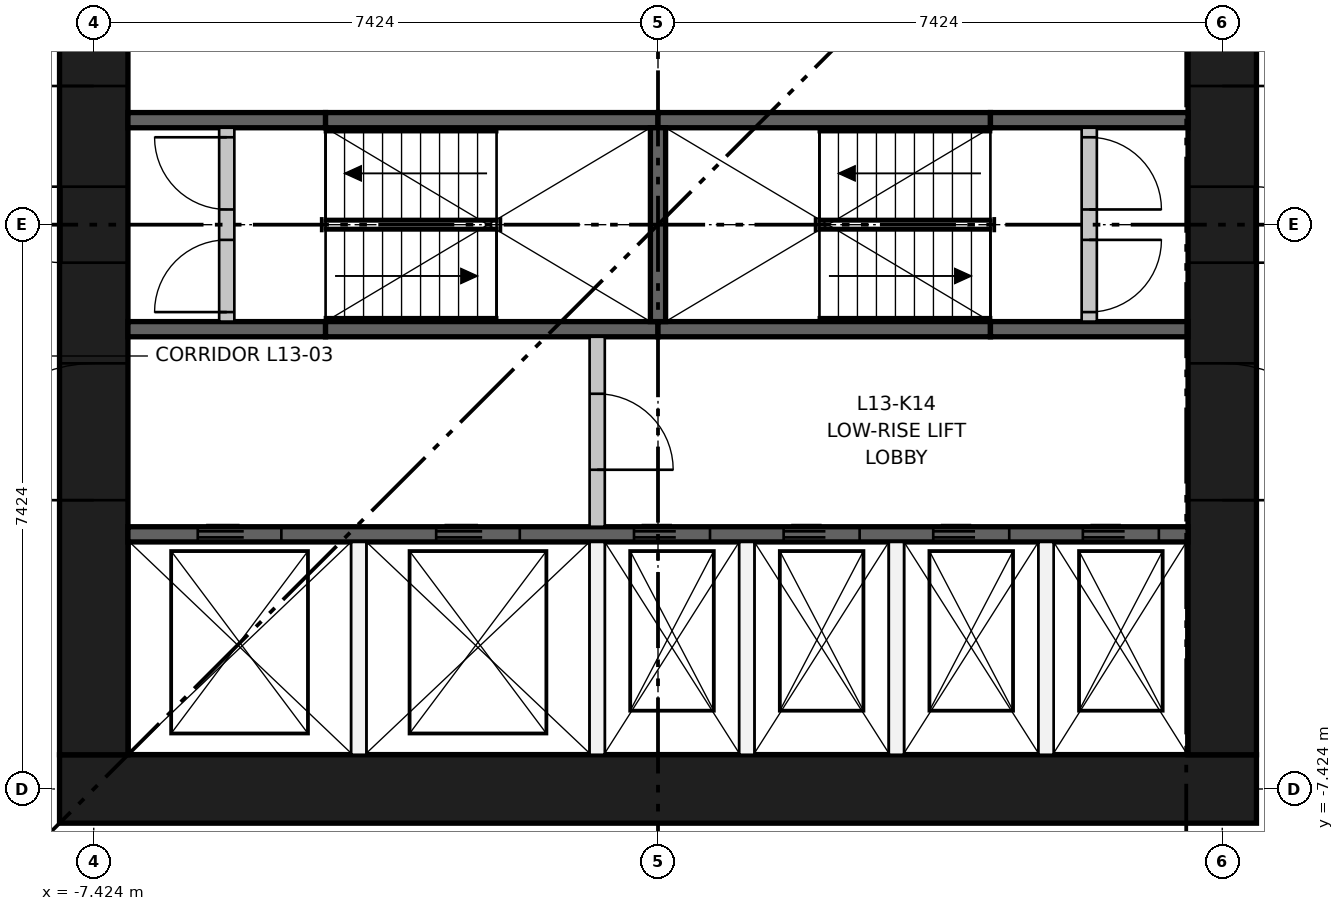
"""IFC4 building model, lengths in metres.
Left out: names, types, materials, properties, quantities, classifications, styles, units other than length and angle.
Written with IfcOpenShell. Run it as: python <this file> out.ifc"""

import sys

from ifc_helpers import new_model, si_unit, direction, frame, frame_2d, origin, place, context, subcontext, project, spatial, rectangle, extrude, element, fill, save


model = new_model("IFC4")
c1 = context("Model", 3, precision=1e-05, world=origin(), true_north=direction((0.0, 1.0)))
c2 = subcontext(c1, "Body", "Model", "MODEL_VIEW")
j1 = project(units=[si_unit("LENGTHUNIT", "METRE"), si_unit("PLANEANGLEUNIT", "RADIAN")], contexts=[c1])
p1 = place(None, origin())
s1 = spatial("IfcSite", under=j1, at=p1, CompositionType="ELEMENT")
p2 = place(p1, origin())
s2 = spatial("IfcBuilding", under=s1, at=p2, CompositionType="ELEMENT")
p3 = place(p2, frame((0.0, 0.0, 51.75)))
s3 = spatial("IfcBuildingStorey", under=s2, at=p3, CompositionType="ELEMENT", Elevation=51.75)
p4 = place(p3, frame((-7.874, -7.424, 0.0), z_axis=(0.0, 0.0, 1.0), x_axis=(1.0, 0.0, 0.0)))
e1 = element("IfcWall", 1, at=p4, inside=s3, PredefinedType="SHEAR", context=c2, shape_type="SweptSolid", body=[
    extrude(rectangle(XDim=15.748, YDim=0.9, at=frame_2d((7.874, 0.0))), origin(), (0.0, 0.0, 1.0), 3.65),
])
p5 = place(p3, frame((-7.424, -6.974, 0.0), z_axis=(0.0, 0.0, 1.0), x_axis=(0.0, 1.0, 0.0)))
e2 = element("IfcWall", 2, at=p5, inside=s3, PredefinedType="SHEAR", context=c2, shape_type="SweptSolid", body=[
    extrude(rectangle(XDim=13.948, YDim=0.9, at=frame_2d((6.974, 0.0))), origin(), (0.0, 0.0, 1.0), 3.65),
])
p6 = place(p5, frame((6.474, 0.0, 0.0)))
e3 = element("IfcOpeningElement", 3, at=p6, cuts=e2, PredefinedType="OPENING", context=c2, shape_type="SweptSolid", body=[
    extrude(rectangle(XDim=1.0, YDim=2.1, at=frame_2d((0.5, 1.05))), frame((0.0, 0.46, 0.0), z_axis=(0.0, -1.0, 0.0), x_axis=(1.0, 0.0, 0.0)), (0.0, 0.0, 1.0), 0.92),
])
p7 = place(p5, frame((3.35, 0.0, 0.0)))
e4 = element("IfcOpeningElement", 4, at=p7, cuts=e2, PredefinedType="OPENING", context=c2, shape_type="SweptSolid", body=[
    extrude(rectangle(XDim=1.8, YDim=2.1, at=frame_2d((0.9, 1.05))), frame((0.0, 0.46, 0.0), z_axis=(0.0, -1.0, 0.0), x_axis=(1.0, 0.0, 0.0)), (0.0, 0.0, 1.0), 0.92),
])
p8 = place(p5, frame((8.799, 0.0, 0.0)))
e5 = element("IfcOpeningElement", 5, at=p8, cuts=e2, PredefinedType="OPENING", context=c2, shape_type="SweptSolid", body=[
    extrude(rectangle(XDim=1.8, YDim=2.1, at=frame_2d((0.9, 1.05))), frame((0.0, 0.46, 0.0), z_axis=(0.0, -1.0, 0.0), x_axis=(1.0, 0.0, 0.0)), (0.0, 0.0, 1.0), 0.92),
])
p9 = place(p5, frame((11.974, 0.0, 0.0)))
e6 = element("IfcOpeningElement", 6, at=p9, cuts=e2, PredefinedType="OPENING", context=c2, shape_type="SweptSolid", body=[
    extrude(rectangle(XDim=1.0, YDim=2.1, at=frame_2d((0.5, 1.05))), frame((0.0, 0.46, 0.0), z_axis=(0.0, -1.0, 0.0), x_axis=(1.0, 0.0, 0.0)), (0.0, 0.0, 1.0), 0.92),
])
p10 = place(p3, frame((7.424, -6.974, 0.0), z_axis=(0.0, 0.0, 1.0), x_axis=(0.0, 1.0, 0.0)))
e7 = element("IfcWall", 7, at=p10, inside=s3, PredefinedType="SHEAR", context=c2, shape_type="SweptSolid", body=[
    extrude(rectangle(XDim=13.948, YDim=0.9, at=frame_2d((6.974, 0.0))), origin(), (0.0, 0.0, 1.0), 3.65),
])
p11 = place(p10, frame((6.474, 0.0, 0.0)))
e8 = element("IfcOpeningElement", 8, at=p11, cuts=e7, PredefinedType="OPENING", context=c2, shape_type="SweptSolid", body=[
    extrude(rectangle(XDim=1.0, YDim=2.1, at=frame_2d((0.5, 1.05))), frame((0.0, 0.46, 0.0), z_axis=(0.0, -1.0, 0.0), x_axis=(1.0, 0.0, 0.0)), (0.0, 0.0, 1.0), 0.92),
])
p12 = place(p10, frame((3.35, 0.0, 0.0)))
e9 = element("IfcOpeningElement", 9, at=p12, cuts=e7, PredefinedType="OPENING", context=c2, shape_type="SweptSolid", body=[
    extrude(rectangle(XDim=1.8, YDim=2.1, at=frame_2d((0.9, 1.05))), frame((0.0, 0.46, 0.0), z_axis=(0.0, -1.0, 0.0), x_axis=(1.0, 0.0, 0.0)), (0.0, 0.0, 1.0), 0.92),
])
p13 = place(p10, frame((8.799, 0.0, 0.0)))
e10 = element("IfcOpeningElement", 10, at=p13, cuts=e7, PredefinedType="OPENING", context=c2, shape_type="SweptSolid", body=[
    extrude(rectangle(XDim=1.8, YDim=2.1, at=frame_2d((0.9, 1.05))), frame((0.0, 0.46, 0.0), z_axis=(0.0, -1.0, 0.0), x_axis=(1.0, 0.0, 0.0)), (0.0, 0.0, 1.0), 0.92),
])
p14 = place(p3, frame((-6.974, -4.074, 0.0), z_axis=(0.0, 0.0, 1.0), x_axis=(1.0, 0.0, 0.0)))
e11 = element("IfcWall", 11, at=p14, inside=s3, PredefinedType="SHEAR", context=c2, shape_type="SweptSolid", body=[
    extrude(rectangle(XDim=13.948, YDim=0.2, at=frame_2d((6.974, 0.0))), origin(), (0.0, 0.0, 1.0), 3.3),
])
p15 = place(p14, frame((0.918, 0.0, 0.0)))
e12 = element("IfcOpeningElement", 12, at=p15, cuts=e11, PredefinedType="OPENING", context=c2, shape_type="SweptSolid", body=[
    extrude(rectangle(XDim=1.1, YDim=2.1, at=frame_2d((0.55, 1.05))), frame((0.0, 0.11, 0.0), z_axis=(0.0, -1.0, 0.0), x_axis=(1.0, 0.0, 0.0)), (0.0, 0.0, 1.0), 0.22),
])
p16 = place(p14, frame((4.055, 0.0, 0.0)))
e13 = element("IfcOpeningElement", 13, at=p16, cuts=e11, PredefinedType="OPENING", context=c2, shape_type="SweptSolid", body=[
    extrude(rectangle(XDim=1.1, YDim=2.1, at=frame_2d((0.55, 1.05))), frame((0.0, 0.11, 0.0), z_axis=(0.0, -1.0, 0.0), x_axis=(1.0, 0.0, 0.0)), (0.0, 0.0, 1.0), 0.22),
])
p17 = place(p14, frame((6.658, 0.0, 0.0)))
e14 = element("IfcOpeningElement", 14, at=p17, cuts=e11, PredefinedType="OPENING", context=c2, shape_type="SweptSolid", body=[
    extrude(rectangle(XDim=1.0, YDim=2.1, at=frame_2d((0.5, 1.05))), frame((0.0, 0.11, 0.0), z_axis=(0.0, -1.0, 0.0), x_axis=(1.0, 0.0, 0.0)), (0.0, 0.0, 1.0), 0.22),
])
p18 = place(p14, frame((8.627, 0.0, 0.0)))
e15 = element("IfcOpeningElement", 15, at=p18, cuts=e11, PredefinedType="OPENING", context=c2, shape_type="SweptSolid", body=[
    extrude(rectangle(XDim=1.0, YDim=2.1, at=frame_2d((0.5, 1.05))), frame((0.0, 0.11, 0.0), z_axis=(0.0, -1.0, 0.0), x_axis=(1.0, 0.0, 0.0)), (0.0, 0.0, 1.0), 0.22),
])
p19 = place(p14, frame((10.595, 0.0, 0.0)))
e16 = element("IfcOpeningElement", 16, at=p19, cuts=e11, PredefinedType="OPENING", context=c2, shape_type="SweptSolid", body=[
    extrude(rectangle(XDim=1.0, YDim=2.1, at=frame_2d((0.5, 1.05))), frame((0.0, 0.11, 0.0), z_axis=(0.0, -1.0, 0.0), x_axis=(1.0, 0.0, 0.0)), (0.0, 0.0, 1.0), 0.22),
])
p20 = place(p14, frame((12.564, 0.0, 0.0)))
e17 = element("IfcOpeningElement", 17, at=p20, cuts=e11, PredefinedType="OPENING", context=c2, shape_type="SweptSolid", body=[
    extrude(rectangle(XDim=1.0, YDim=2.1, at=frame_2d((0.5, 1.05))), frame((0.0, 0.11, 0.0), z_axis=(0.0, -1.0, 0.0), x_axis=(1.0, 0.0, 0.0)), (0.0, 0.0, 1.0), 0.22),
])
p21 = place(p3, frame((-6.974, -1.375, 0.0), z_axis=(0.0, 0.0, 1.0), x_axis=(1.0, 0.0, 0.0)))
e18 = element("IfcWall", 18, at=p21, inside=s3, PredefinedType="SHEAR", context=c2, shape_type="SweptSolid", body=[
    extrude(rectangle(XDim=2.6, YDim=0.2, at=frame_2d((1.3, 0.0))), origin(), (0.0, 0.0, 1.0), 3.3),
])
for number, where, z_axis, x_axis in (
    (19, (-4.374, -1.375, 0.0), (0.0, 0.0, 1.0), (1.0, 0.0, 0.0)),
    (20, (0.0, -1.375, 0.0), (0.0, 0.0, 1.0), (1.0, 0.0, 0.0)),
):
    element("IfcWall", number, at=place(p3, frame(where, z_axis=z_axis, x_axis=x_axis)), inside=s3, PredefinedType="SHEAR", context=c2, shape_type="SweptSolid", body=[
        extrude(rectangle(XDim=4.374, YDim=0.2, at=frame_2d((2.187, 0.0))), origin(), (0.0, 0.0, 1.0), 3.3),
    ])
for number, where, z_axis, x_axis in (
    (21, (4.374, -1.375, 0.0), (0.0, 0.0, 1.0), (1.0, 0.0, 0.0)),
    (22, (-6.974, 1.375, 0.0), (0.0, 0.0, 1.0), (1.0, 0.0, 0.0)),
):
    element("IfcWall", number, at=place(p3, frame(where, z_axis=z_axis, x_axis=x_axis)), inside=s3, PredefinedType="SHEAR", context=c2, shape_type="SweptSolid", body=[
        extrude(rectangle(XDim=2.6, YDim=0.2, at=frame_2d((1.3, 0.0))), origin(), (0.0, 0.0, 1.0), 3.3),
    ])
for number, where, z_axis, x_axis in (
    (23, (-4.374, 1.375, 0.0), (0.0, 0.0, 1.0), (1.0, 0.0, 0.0)),
    (24, (0.0, 1.375, 0.0), (0.0, 0.0, 1.0), (1.0, 0.0, 0.0)),
):
    element("IfcWall", number, at=place(p3, frame(where, z_axis=z_axis, x_axis=x_axis)), inside=s3, PredefinedType="SHEAR", context=c2, shape_type="SweptSolid", body=[
        extrude(rectangle(XDim=4.374, YDim=0.2, at=frame_2d((2.187, 0.0))), origin(), (0.0, 0.0, 1.0), 3.3),
    ])
p22 = place(p3, frame((4.374, 1.375, 0.0), z_axis=(0.0, 0.0, 1.0), x_axis=(1.0, 0.0, 0.0)))
e25 = element("IfcWall", 25, at=p22, inside=s3, PredefinedType="SHEAR", context=c2, shape_type="SweptSolid", body=[
    extrude(rectangle(XDim=2.6, YDim=0.2, at=frame_2d((1.3, 0.0))), origin(), (0.0, 0.0, 1.0), 3.3),
])
p23 = place(p3, frame((0.0, -1.275, 0.0), z_axis=(0.0, 0.0, 1.0), x_axis=(0.0, 1.0, 0.0)))
e26 = element("IfcWall", 26, at=p23, inside=s3, PredefinedType="SHEAR", context=c2, shape_type="SweptSolid", body=[
    extrude(rectangle(XDim=2.55, YDim=0.2, at=frame_2d((1.275, 0.0))), origin(), (0.0, 0.0, 1.0), 3.3),
])
for number, where, z_axis, x_axis in (
    (27, (-3.937, -6.974, 0.0), (0.0, 0.0, 1.0), (0.0, 1.0, 0.0)),
    (28, (-0.8, -6.974, 0.0), (0.0, 0.0, 1.0), (0.0, 1.0, 0.0)),
):
    element("IfcWall", number, at=place(p3, frame(where, z_axis=z_axis, x_axis=x_axis)), inside=s3, PredefinedType="PARTITIONING", context=c2, shape_type="SweptSolid", body=[
        extrude(rectangle(XDim=2.8, YDim=0.2, at=frame_2d((1.4, 0.0))), origin(), (0.0, 0.0, 1.0), 3.3),
    ])
p24 = place(p3, frame((-0.8, -3.974, 0.0), z_axis=(0.0, 0.0, 1.0), x_axis=(0.0, 1.0, 0.0)))
e29 = element("IfcWall", 29, at=p24, inside=s3, PredefinedType="PARTITIONING", context=c2, shape_type="SweptSolid", body=[
    extrude(rectangle(XDim=2.499, YDim=0.2, at=frame_2d((1.25, 0.0))), origin(), (0.0, 0.0, 1.0), 3.3),
])
p25 = place(p24, frame((0.75, 0.0, 0.0)))
e30 = element("IfcOpeningElement", 30, at=p25, cuts=e29, PredefinedType="OPENING", context=c2, shape_type="SweptSolid", body=[
    extrude(rectangle(XDim=1.0, YDim=2.1, at=frame_2d((0.5, 1.05))), frame((0.0, 0.11, 0.0), z_axis=(0.0, -1.0, 0.0), x_axis=(1.0, 0.0, 0.0)), (0.0, 0.0, 1.0), 0.22),
])
for number, where, z_axis, x_axis in (
    (31, (1.168, -6.974, 0.0), (0.0, 0.0, 1.0), (0.0, 1.0, 0.0)),
    (32, (3.137, -6.974, 0.0), (0.0, 0.0, 1.0), (0.0, 1.0, 0.0)),
    (33, (5.105, -6.974, 0.0), (0.0, 0.0, 1.0), (0.0, 1.0, 0.0)),
):
    element("IfcWall", number, at=place(p3, frame(where, z_axis=z_axis, x_axis=x_axis)), inside=s3, PredefinedType="PARTITIONING", context=c2, shape_type="SweptSolid", body=[
        extrude(rectangle(XDim=2.8, YDim=0.2, at=frame_2d((1.4, 0.0))), origin(), (0.0, 0.0, 1.0), 3.3),
    ])
p26 = place(p3, frame((-5.674, -1.275, 0.0), z_axis=(0.0, 0.0, 1.0), x_axis=(0.0, 1.0, 0.0)))
e34 = element("IfcWall", 34, at=p26, inside=s3, PredefinedType="PARTITIONING", context=c2, shape_type="SweptSolid", body=[
    extrude(rectangle(XDim=2.55, YDim=0.2, at=frame_2d((1.275, 0.0))), origin(), (0.0, 0.0, 1.0), 3.3),
])
p27 = place(p26, frame((0.125, 0.0, 0.0)))
e35 = element("IfcOpeningElement", 35, at=p27, cuts=e34, PredefinedType="OPENING", context=c2, shape_type="SweptSolid", body=[
    extrude(rectangle(XDim=0.95, YDim=2.1, at=frame_2d((0.475, 1.05))), frame((0.0, 0.11, 0.0), z_axis=(0.0, -1.0, 0.0), x_axis=(1.0, 0.0, 0.0)), (0.0, 0.0, 1.0), 0.22),
])
p28 = place(p26, frame((1.475, 0.0, 0.0)))
e36 = element("IfcOpeningElement", 36, at=p28, cuts=e34, PredefinedType="OPENING", context=c2, shape_type="SweptSolid", body=[
    extrude(rectangle(XDim=0.95, YDim=2.1, at=frame_2d((0.475, 1.05))), frame((0.0, 0.11, 0.0), z_axis=(0.0, -1.0, 0.0), x_axis=(1.0, 0.0, 0.0)), (0.0, 0.0, 1.0), 0.22),
])
p29 = place(p3, frame((5.674, -1.275, 0.0), z_axis=(0.0, 0.0, 1.0), x_axis=(0.0, 1.0, 0.0)))
e37 = element("IfcWall", 37, at=p29, inside=s3, PredefinedType="PARTITIONING", context=c2, shape_type="SweptSolid", body=[
    extrude(rectangle(XDim=2.55, YDim=0.2, at=frame_2d((1.275, 0.0))), origin(), (0.0, 0.0, 1.0), 3.3),
])
p30 = place(p29, frame((0.125, 0.0, 0.0)))
e38 = element("IfcOpeningElement", 38, at=p30, cuts=e37, PredefinedType="OPENING", context=c2, shape_type="SweptSolid", body=[
    extrude(rectangle(XDim=0.95, YDim=2.1, at=frame_2d((0.475, 1.05))), frame((0.0, 0.11, 0.0), z_axis=(0.0, -1.0, 0.0), x_axis=(1.0, 0.0, 0.0)), (0.0, 0.0, 1.0), 0.22),
])
p31 = place(p29, frame((1.475, 0.0, 0.0)))
e39 = element("IfcOpeningElement", 39, at=p31, cuts=e37, PredefinedType="OPENING", context=c2, shape_type="SweptSolid", body=[
    extrude(rectangle(XDim=0.95, YDim=2.1, at=frame_2d((0.475, 1.05))), frame((0.0, 0.11, 0.0), z_axis=(0.0, -1.0, 0.0), x_axis=(1.0, 0.0, 0.0)), (0.0, 0.0, 1.0), 0.22),
])
p32 = place(p15, origin())
e40 = element("IfcDoor", 40, at=p32, inside=s3, OperationType="DOUBLE_DOOR_SLIDING", PredefinedType="DOOR", context=c2, shape_type="SweptSolid", body=[
    extrude(rectangle(XDim=1.1, YDim=2.1, at=frame_2d((0.55, 1.05))), frame((0.0, 0.025, 0.0), z_axis=(0.0, -1.0, 0.0), x_axis=(1.0, 0.0, 0.0)), (0.0, 0.0, 1.0), 0.05),
])
fill(e12, e40)
p33 = place(p16, origin())
e41 = element("IfcDoor", 41, at=p33, inside=s3, OperationType="DOUBLE_DOOR_SLIDING", PredefinedType="DOOR", context=c2, shape_type="SweptSolid", body=[
    extrude(rectangle(XDim=1.1, YDim=2.1, at=frame_2d((0.55, 1.05))), frame((0.0, 0.025, 0.0), z_axis=(0.0, -1.0, 0.0), x_axis=(1.0, 0.0, 0.0)), (0.0, 0.0, 1.0), 0.05),
])
fill(e13, e41)
p34 = place(p17, origin())
e42 = element("IfcDoor", 42, at=p34, inside=s3, OperationType="DOUBLE_DOOR_SLIDING", PredefinedType="DOOR", context=c2, shape_type="SweptSolid", body=[
    extrude(rectangle(XDim=1.0, YDim=2.1, at=frame_2d((0.5, 1.05))), frame((0.0, 0.025, 0.0), z_axis=(0.0, -1.0, 0.0), x_axis=(1.0, 0.0, 0.0)), (0.0, 0.0, 1.0), 0.05),
])
fill(e14, e42)
p35 = place(p18, origin())
e43 = element("IfcDoor", 43, at=p35, inside=s3, OperationType="DOUBLE_DOOR_SLIDING", PredefinedType="DOOR", context=c2, shape_type="SweptSolid", body=[
    extrude(rectangle(XDim=1.0, YDim=2.1, at=frame_2d((0.5, 1.05))), frame((0.0, 0.025, 0.0), z_axis=(0.0, -1.0, 0.0), x_axis=(1.0, 0.0, 0.0)), (0.0, 0.0, 1.0), 0.05),
])
fill(e15, e43)
p36 = place(p19, origin())
e44 = element("IfcDoor", 44, at=p36, inside=s3, OperationType="DOUBLE_DOOR_SLIDING", PredefinedType="DOOR", context=c2, shape_type="SweptSolid", body=[
    extrude(rectangle(XDim=1.0, YDim=2.1, at=frame_2d((0.5, 1.05))), frame((0.0, 0.025, 0.0), z_axis=(0.0, -1.0, 0.0), x_axis=(1.0, 0.0, 0.0)), (0.0, 0.0, 1.0), 0.05),
])
fill(e16, e44)
p37 = place(p20, origin())
e45 = element("IfcDoor", 45, at=p37, inside=s3, OperationType="DOUBLE_DOOR_SLIDING", PredefinedType="DOOR", context=c2, shape_type="SweptSolid", body=[
    extrude(rectangle(XDim=1.0, YDim=2.1, at=frame_2d((0.5, 1.05))), frame((0.0, 0.025, 0.0), z_axis=(0.0, -1.0, 0.0), x_axis=(1.0, 0.0, 0.0)), (0.0, 0.0, 1.0), 0.05),
])
fill(e17, e45)
p38 = place(p27, origin())
e46 = element("IfcDoor", 46, at=p38, inside=s3, OperationType="SINGLE_SWING_LEFT", PredefinedType="DOOR", context=c2, shape_type="SweptSolid", body=[
    extrude(rectangle(XDim=0.95, YDim=2.1, at=frame_2d((0.475, 1.05))), frame((0.0, 0.025, 0.0), z_axis=(0.0, -1.0, 0.0), x_axis=(1.0, 0.0, 0.0)), (0.0, 0.0, 1.0), 0.05),
])
fill(e35, e46)
p39 = place(p28, origin())
e47 = element("IfcDoor", 47, at=p39, inside=s3, OperationType="SINGLE_SWING_RIGHT", PredefinedType="DOOR", context=c2, shape_type="SweptSolid", body=[
    extrude(rectangle(XDim=0.95, YDim=2.1, at=frame_2d((0.475, 1.05))), frame((0.0, 0.025, 0.0), z_axis=(0.0, -1.0, 0.0), x_axis=(1.0, 0.0, 0.0)), (0.0, 0.0, 1.0), 0.05),
])
fill(e36, e47)
p40 = place(p30, frame((0.95, 0.0, 0.0), z_axis=(0.0, 0.0, 1.0), x_axis=(-1.0, 0.0, 0.0)))
e48 = element("IfcDoor", 48, at=p40, inside=s3, OperationType="SINGLE_SWING_RIGHT", PredefinedType="DOOR", context=c2, shape_type="SweptSolid", body=[
    extrude(rectangle(XDim=0.95, YDim=2.1, at=frame_2d((0.475, 1.05))), frame((0.0, 0.025, 0.0), z_axis=(0.0, -1.0, 0.0), x_axis=(1.0, 0.0, 0.0)), (0.0, 0.0, 1.0), 0.05),
])
fill(e38, e48)
p41 = place(p31, frame((0.95, 0.0, 0.0), z_axis=(0.0, 0.0, 1.0), x_axis=(-1.0, 0.0, 0.0)))
e49 = element("IfcDoor", 49, at=p41, inside=s3, OperationType="SINGLE_SWING_LEFT", PredefinedType="DOOR", context=c2, shape_type="SweptSolid", body=[
    extrude(rectangle(XDim=0.95, YDim=2.1, at=frame_2d((0.475, 1.05))), frame((0.0, 0.025, 0.0), z_axis=(0.0, -1.0, 0.0), x_axis=(1.0, 0.0, 0.0)), (0.0, 0.0, 1.0), 0.05),
])
fill(e39, e49)
p42 = place(p25, frame((1.0, 0.0, 0.0), z_axis=(0.0, 0.0, 1.0), x_axis=(-1.0, 0.0, 0.0)))
e50 = element("IfcDoor", 50, at=p42, inside=s3, OperationType="SINGLE_SWING_LEFT", PredefinedType="DOOR", context=c2, shape_type="SweptSolid", body=[
    extrude(rectangle(XDim=1.0, YDim=2.1, at=frame_2d((0.5, 1.05))), frame((0.0, 0.025, 0.0), z_axis=(0.0, -1.0, 0.0), x_axis=(1.0, 0.0, 0.0)), (0.0, 0.0, 1.0), 0.05),
])
fill(e30, e50)
p43 = place(p6, origin())
e51 = element("IfcDoor", 51, at=p43, inside=s3, OperationType="SINGLE_SWING_RIGHT", PredefinedType="DOOR", context=c2, shape_type="SweptSolid", body=[
    extrude(rectangle(XDim=1.0, YDim=2.1, at=frame_2d((0.5, 1.05))), frame((0.0, 0.45, 0.0), z_axis=(0.0, -1.0, 0.0), x_axis=(1.0, 0.0, 0.0)), (0.0, 0.0, 1.0), 0.05),
])
fill(e3, e51)
p44 = place(p7, origin())
e52 = element("IfcDoor", 52, at=p44, inside=s3, OperationType="DOUBLE_DOOR_SINGLE_SWING", PredefinedType="DOOR", context=c2, shape_type="SweptSolid", body=[
    extrude(rectangle(XDim=1.8, YDim=2.1, at=frame_2d((0.9, 1.05))), frame((0.0, 0.025, 0.0), z_axis=(0.0, -1.0, 0.0), x_axis=(1.0, 0.0, 0.0)), (0.0, 0.0, 1.0), 0.05),
])
fill(e4, e52)
p45 = place(p8, origin())
e53 = element("IfcDoor", 53, at=p45, inside=s3, OperationType="DOUBLE_DOOR_SINGLE_SWING", PredefinedType="DOOR", context=c2, shape_type="SweptSolid", body=[
    extrude(rectangle(XDim=1.8, YDim=2.1, at=frame_2d((0.9, 1.05))), frame((0.0, 0.025, 0.0), z_axis=(0.0, -1.0, 0.0), x_axis=(1.0, 0.0, 0.0)), (0.0, 0.0, 1.0), 0.05),
])
fill(e5, e53)
p46 = place(p11, frame((1.0, 0.0, 0.0), z_axis=(0.0, 0.0, 1.0), x_axis=(-1.0, 0.0, 0.0)))
e54 = element("IfcDoor", 54, at=p46, inside=s3, OperationType="SINGLE_SWING_LEFT", PredefinedType="DOOR", context=c2, shape_type="SweptSolid", body=[
    extrude(rectangle(XDim=1.0, YDim=2.1, at=frame_2d((0.5, 1.05))), frame((0.0, 0.45, 0.0), z_axis=(0.0, -1.0, 0.0), x_axis=(1.0, 0.0, 0.0)), (0.0, 0.0, 1.0), 0.05),
])
fill(e8, e54)
p47 = place(p12, frame((1.8, 0.0, 0.0), z_axis=(0.0, 0.0, 1.0), x_axis=(-1.0, 0.0, 0.0)))
e55 = element("IfcDoor", 55, at=p47, inside=s3, OperationType="DOUBLE_DOOR_SINGLE_SWING", PredefinedType="DOOR", context=c2, shape_type="SweptSolid", body=[
    extrude(rectangle(XDim=1.8, YDim=2.1, at=frame_2d((0.9, 1.05))), frame((0.0, 0.025, 0.0), z_axis=(0.0, -1.0, 0.0), x_axis=(1.0, 0.0, 0.0)), (0.0, 0.0, 1.0), 0.05),
])
fill(e9, e55)
p48 = place(p13, frame((1.8, 0.0, 0.0), z_axis=(0.0, 0.0, 1.0), x_axis=(-1.0, 0.0, 0.0)))
e56 = element("IfcDoor", 56, at=p48, inside=s3, OperationType="DOUBLE_DOOR_SINGLE_SWING", PredefinedType="DOOR", context=c2, shape_type="SweptSolid", body=[
    extrude(rectangle(XDim=1.8, YDim=2.1, at=frame_2d((0.9, 1.05))), frame((0.0, 0.025, 0.0), z_axis=(0.0, -1.0, 0.0), x_axis=(1.0, 0.0, 0.0)), (0.0, 0.0, 1.0), 0.05),
])
fill(e10, e56)
save(model, sys.argv[1])
